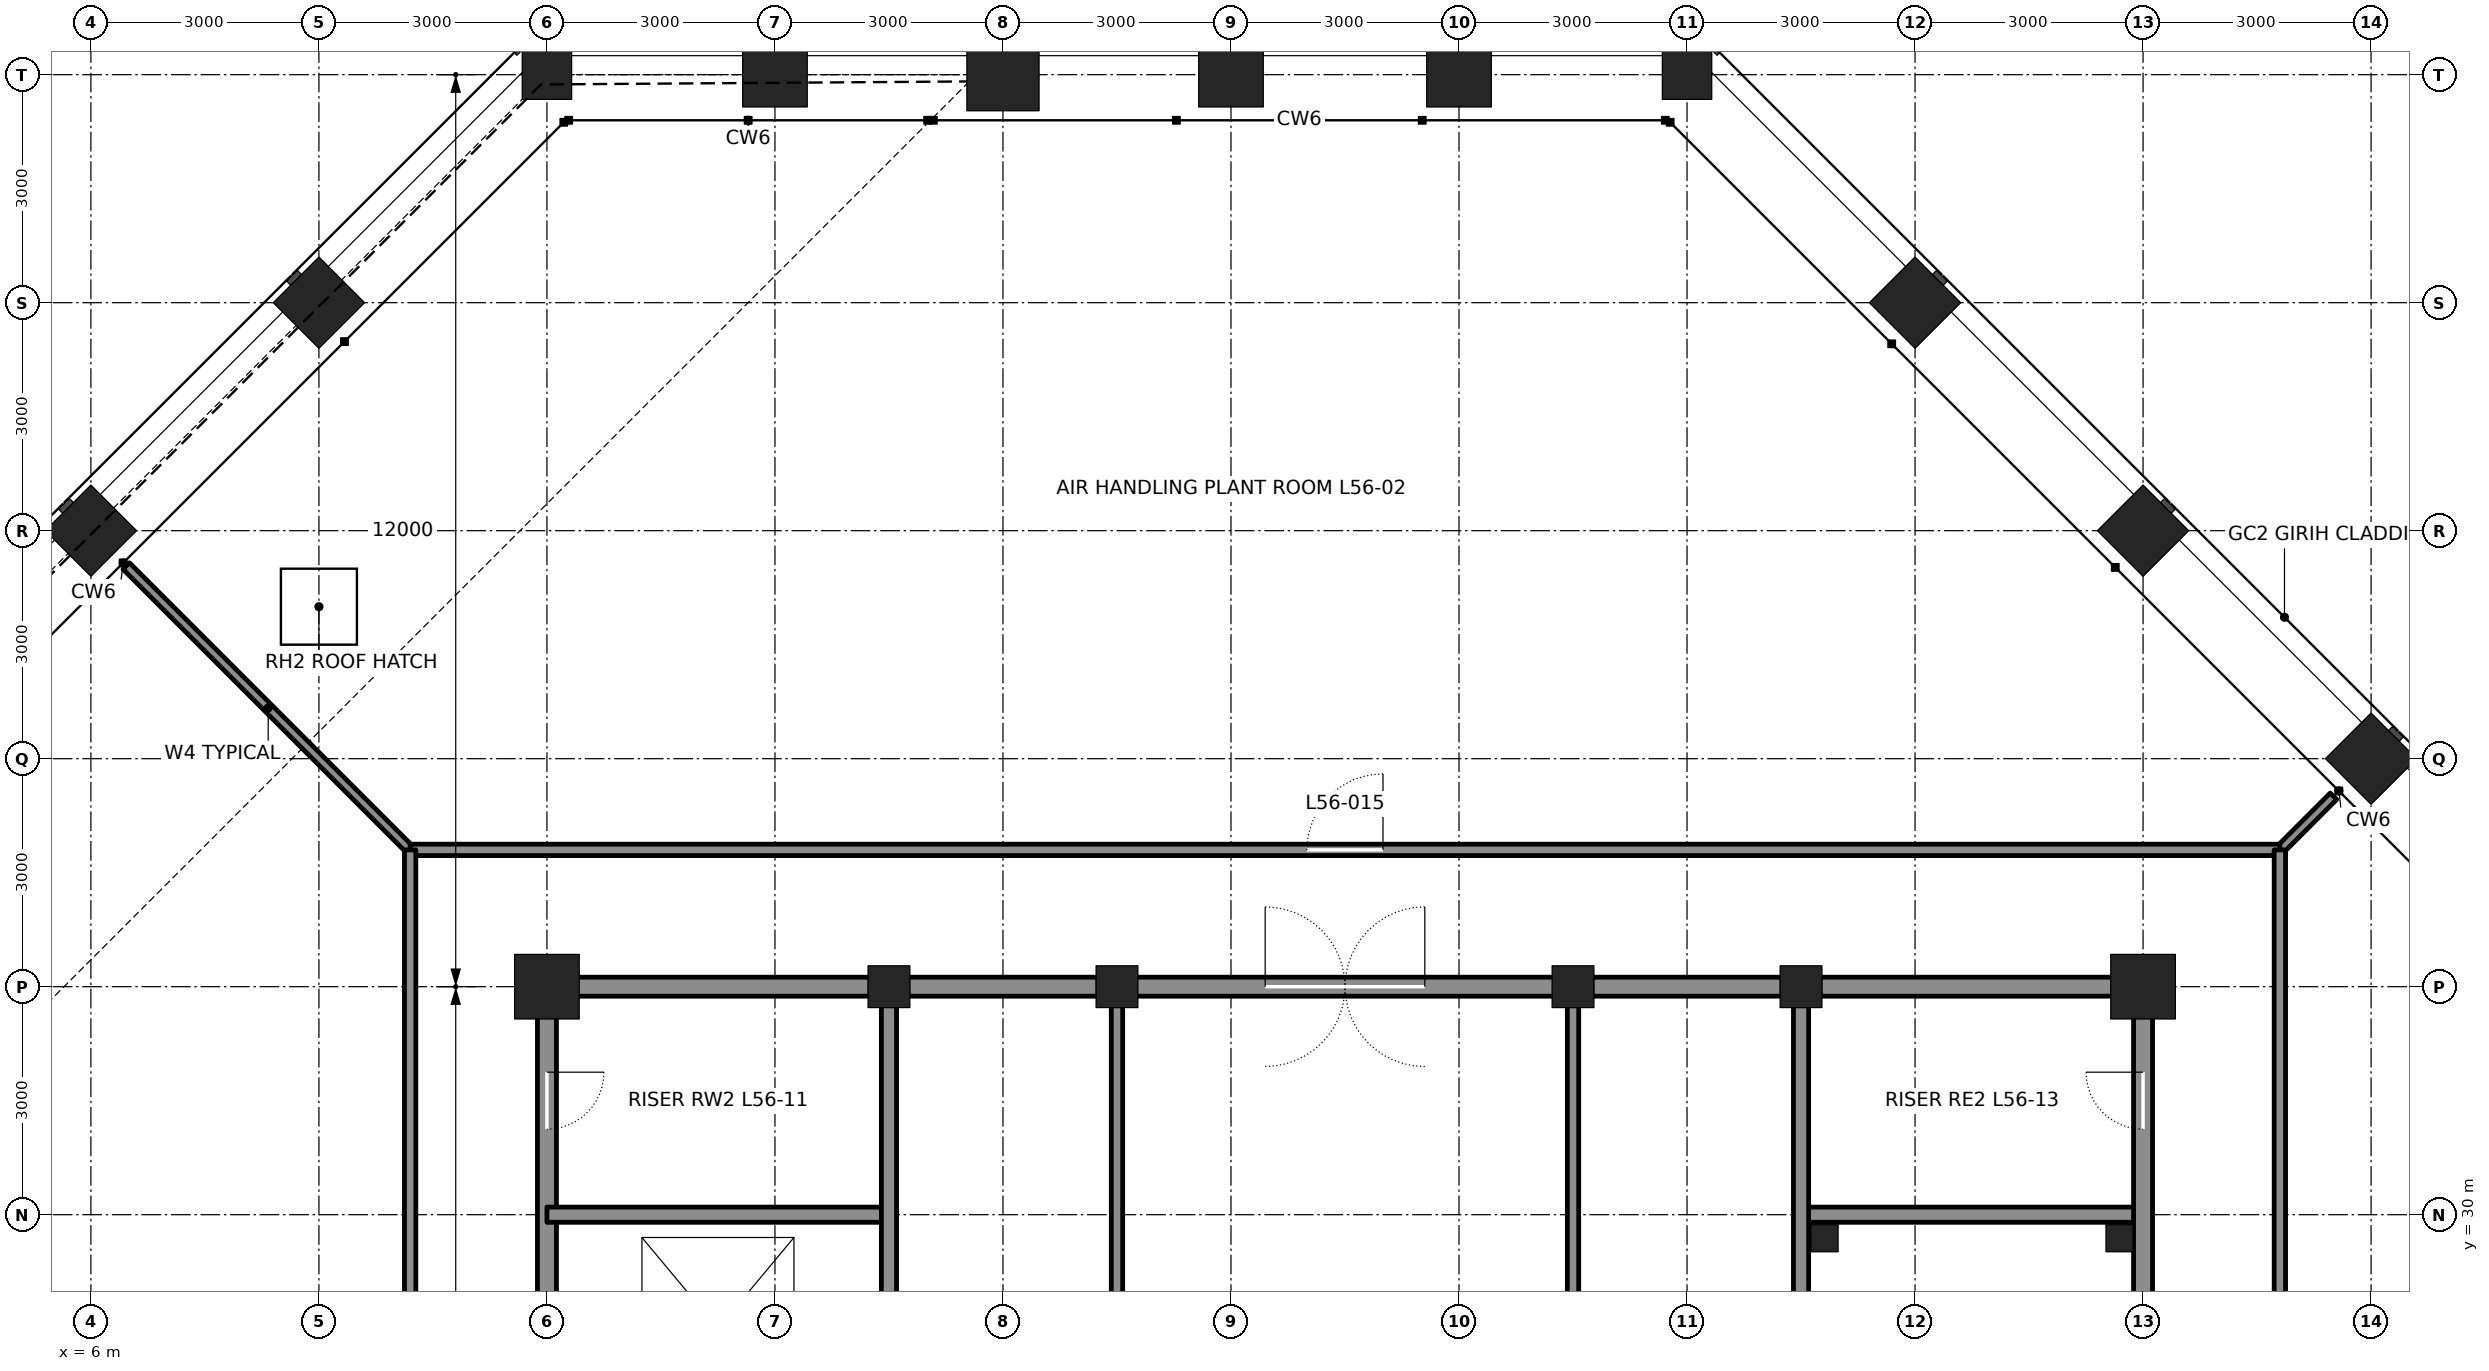
"""IFC4 building model, lengths in metres.
Left out: names, types, materials, properties, quantities, classifications, styles, units other than length and angle.
Written with IfcOpenShell. Run it as: python <this file> out.ifc"""

import sys

from ifc_helpers import new_model, si_unit, direction, frame, frame_2d, origin, origin_2d, place, context, subcontext, project, spatial, rectangle, hollow_rectangle, extrude, element, fill, save


model = new_model("IFC4")
c1 = context("Model", 3, precision=1e-05, world=origin(), true_north=direction((0.0, 1.0)))
c2 = subcontext(c1, "Body", "Model", "MODEL_VIEW")
j1 = project(units=[si_unit("LENGTHUNIT", "METRE"), si_unit("PLANEANGLEUNIT", "RADIAN")], contexts=[c1])
p1 = place(None, origin())
s1 = spatial("IfcSite", under=j1, at=p1, CompositionType="ELEMENT")
p2 = place(p1, origin())
s2 = spatial("IfcBuilding", under=s1, at=p2, CompositionType="ELEMENT")
p3 = place(p2, frame((0.0, 0.0, 251.7)))
s3 = spatial("IfcBuildingStorey", under=s2, at=p3, CompositionType="ELEMENT", Elevation=251.7)
for number, where, z_axis, x_axis in (
    (1, (36.0, 36.0, 0.0), (0.0, 0.0, 1.0), (0.707, 0.707, 0.0)),
    (2, (33.0, 39.0, 0.0), (0.0, 0.0, 1.0), (0.707, 0.707, 0.0)),
    (3, (30.0, 42.0, 0.0), (0.0, 0.0, 1.0), (0.707, 0.707, 0.0)),
):
    element("IfcColumn", number, at=place(p3, frame(where, z_axis=z_axis, x_axis=x_axis)), inside=s3, PredefinedType="COLUMN", context=c2, shape_type="SweptSolid", body=[
        extrude(hollow_rectangle(XDim=0.85, YDim=0.85, WallThickness=0.085, at=origin_2d()), origin(), (0.0, 0.0, 1.0), 6.0),
    ])
p4 = place(p3, frame((27.0, 45.0, 0.0), z_axis=(0.0, 0.0, 1.0), x_axis=(0.0, 1.0, 0.0)))
e4 = element("IfcColumn", 4, at=p4, inside=s3, PredefinedType="COLUMN", context=c2, shape_type="SweptSolid", body=[
    extrude(hollow_rectangle(XDim=0.65, YDim=0.65, WallThickness=0.065, at=origin_2d()), origin(), (0.0, 0.0, 1.0), 6.0),
])
for number, where, z_axis, x_axis in (
    (5, (24.0, 45.0, 0.0), (0.0, 0.0, 1.0), (0.0, 1.0, 0.0)),
    (6, (21.0, 45.0, 0.0), (0.0, 0.0, 1.0), (0.0, 1.0, 0.0)),
):
    element("IfcColumn", number, at=place(p3, frame(where, z_axis=z_axis, x_axis=x_axis)), inside=s3, PredefinedType="COLUMN", context=c2, shape_type="SweptSolid", body=[
        extrude(hollow_rectangle(XDim=0.85, YDim=0.85, WallThickness=0.085, at=origin_2d()), origin(), (0.0, 0.0, 1.0), 6.0),
    ])
p5 = place(p3, frame((18.0, 45.0, 0.0), z_axis=(0.0, 0.0, 1.0), x_axis=(0.0, 1.0, 0.0)))
e7 = element("IfcColumn", 7, at=p5, inside=s3, PredefinedType="COLUMN", context=c2, shape_type="SweptSolid", body=[
    extrude(hollow_rectangle(XDim=0.95, YDim=0.95, WallThickness=0.11, at=origin_2d()), origin(), (0.0, 0.0, 1.0), 6.0),
])
p6 = place(p3, frame((15.0, 45.0, 0.0), z_axis=(0.0, 0.0, 1.0), x_axis=(0.0, 1.0, 0.0)))
e8 = element("IfcColumn", 8, at=p6, inside=s3, PredefinedType="COLUMN", context=c2, shape_type="SweptSolid", body=[
    extrude(hollow_rectangle(XDim=0.85, YDim=0.85, WallThickness=0.085, at=origin_2d()), origin(), (0.0, 0.0, 1.0), 4.149),
])
p7 = place(p3, frame((12.0, 45.0, 0.0), z_axis=(0.0, 0.0, 1.0), x_axis=(0.0, 1.0, 0.0)))
e9 = element("IfcColumn", 9, at=p7, inside=s3, PredefinedType="COLUMN", context=c2, shape_type="SweptSolid", body=[
    extrude(hollow_rectangle(XDim=0.65, YDim=0.65, WallThickness=0.065, at=origin_2d()), origin(), (0.0, 0.0, 1.0), 3.698),
])
for number, where, z_axis, x_axis in (
    (10, (9.0, 42.0, 0.0), (0.0, 0.0, 1.0), (-0.707, 0.707, 0.0)),
    (11, (6.0, 39.0, 0.0), (0.0, 0.0, 1.0), (-0.707, 0.707, 0.0)),
):
    element("IfcColumn", number, at=place(p3, frame(where, z_axis=z_axis, x_axis=x_axis)), inside=s3, PredefinedType="COLUMN", context=c2, shape_type="SweptSolid", body=[
        extrude(hollow_rectangle(XDim=0.85, YDim=0.85, WallThickness=0.085, at=origin_2d()), origin(), (0.0, 0.0, 1.0), 3.698),
    ])
p8 = place(p3, frame((12.0, 33.0, 0.0), z_axis=(0.0, 0.0, 1.0), x_axis=(1.0, 0.0, 0.0)))
e12 = element("IfcColumn", 12, at=p8, inside=s3, PredefinedType="COLUMN", context=c2, shape_type="SweptSolid", body=[
    extrude(hollow_rectangle(XDim=0.85, YDim=0.85, WallThickness=0.085, at=origin_2d()), origin(), (0.0, 0.0, 1.0), 6.0),
])
for number, where, z_axis, x_axis in (
    (13, (16.5, 33.0, 0.0), (0.0, 0.0, 1.0), (1.0, 0.0, 0.0)),
    (14, (19.5, 33.0, 0.0), (0.0, 0.0, 1.0), (1.0, 0.0, 0.0)),
    (15, (25.5, 33.0, 0.0), (0.0, 0.0, 1.0), (1.0, 0.0, 0.0)),
    (16, (28.5, 33.0, 0.0), (0.0, 0.0, 1.0), (1.0, 0.0, 0.0)),
):
    element("IfcColumn", number, at=place(p3, frame(where, z_axis=z_axis, x_axis=x_axis)), inside=s3, PredefinedType="COLUMN", context=c2, shape_type="SweptSolid", body=[
        extrude(hollow_rectangle(XDim=0.55, YDim=0.55, WallThickness=0.045, at=origin_2d()), origin(), (0.0, 0.0, 1.0), 6.0),
    ])
p9 = place(p3, frame((33.0, 33.0, 0.0), z_axis=(0.0, 0.0, 1.0), x_axis=(1.0, 0.0, 0.0)))
e17 = element("IfcColumn", 17, at=p9, inside=s3, PredefinedType="COLUMN", context=c2, shape_type="SweptSolid", body=[
    extrude(hollow_rectangle(XDim=0.85, YDim=0.85, WallThickness=0.085, at=origin_2d()), origin(), (0.0, 0.0, 1.0), 6.0),
])
p10 = place(p3, frame((12.0, 24.25, 0.0), z_axis=(0.0, 0.0, 1.0), x_axis=(0.0, 1.0, 0.0)))
e18 = element("IfcWall", 18, at=p10, inside=s3, PredefinedType="SOLIDWALL", context=c2, shape_type="SweptSolid", body=[
    extrude(rectangle(XDim=8.5, YDim=0.25, at=frame_2d((4.25, 0.0))), origin(), (0.0, 0.0, 1.0), 4.913),
])
p11 = place(p10, frame((0.65, 0.0, 0.0)))
e19 = element("IfcOpeningElement", 19, at=p11, cuts=e18, PredefinedType="OPENING", context=c2, shape_type="SweptSolid", body=[
    extrude(rectangle(XDim=1.2, YDim=2.1, at=frame_2d((0.6, 1.05))), frame((0.0, 0.135, 0.0), z_axis=(0.0, -1.0, 0.0), x_axis=(1.0, 0.0, 0.0)), (0.0, 0.0, 1.0), 0.27),
])
p12 = place(p10, frame((6.875, 0.0, 0.0)))
e20 = element("IfcOpeningElement", 20, at=p12, cuts=e18, PredefinedType="OPENING", context=c2, shape_type="SweptSolid", body=[
    extrude(rectangle(XDim=0.75, YDim=2.1, at=frame_2d((0.375, 1.05))), frame((0.0, 0.135, 0.0), z_axis=(0.0, -1.0, 0.0), x_axis=(1.0, 0.0, 0.0)), (0.0, 0.0, 1.0), 0.27),
])
for number, where, z_axis, x_axis in (
    (21, (12.0, 30.0, 0.0), (0.0, 0.0, 1.0), (1.0, 0.0, 0.0)),
    (22, (28.5, 30.0, 0.0), (0.0, 0.0, 1.0), (1.0, 0.0, 0.0)),
):
    element("IfcWall", number, at=place(p3, frame(where, z_axis=z_axis, x_axis=x_axis)), inside=s3, PredefinedType="SOLIDWALL", context=c2, shape_type="SweptSolid", body=[
        extrude(rectangle(XDim=4.5, YDim=0.2, at=frame_2d((2.25, 0.0))), origin(), (0.0, 0.0, 1.0), 5.84),
    ])
p13 = place(p3, frame((12.25, 33.0, 0.0), z_axis=(0.0, 0.0, 1.0), x_axis=(1.0, 0.0, 0.0)))
e23 = element("IfcWall", 23, at=p13, inside=s3, PredefinedType="SOLIDWALL", context=c2, shape_type="SweptSolid", body=[
    extrude(rectangle(XDim=4.0, YDim=0.25, at=frame_2d((2.0, 0.0))), origin(), (0.0, 0.0, 1.0), 4.981),
])
for number, where, z_axis, x_axis in (
    (24, (16.75, 33.0, 0.0), (0.0, 0.0, 1.0), (1.0, 0.0, 0.0)),
    (25, (25.75, 33.0, 0.0), (0.0, 0.0, 1.0), (1.0, 0.0, 0.0)),
):
    element("IfcWall", number, at=place(p3, frame(where, z_axis=z_axis, x_axis=x_axis)), inside=s3, PredefinedType="SOLIDWALL", context=c2, shape_type="SweptSolid", body=[
        extrude(rectangle(XDim=2.5, YDim=0.25, at=frame_2d((1.25, 0.0))), origin(), (0.0, 0.0, 1.0), 4.981),
    ])
p14 = place(p3, frame((28.75, 33.0, 0.0), z_axis=(0.0, 0.0, 1.0), x_axis=(1.0, 0.0, 0.0)))
e26 = element("IfcWall", 26, at=p14, inside=s3, PredefinedType="SOLIDWALL", context=c2, shape_type="SweptSolid", body=[
    extrude(rectangle(XDim=4.0, YDim=0.25, at=frame_2d((2.0, 0.0))), origin(), (0.0, 0.0, 1.0), 4.981),
])
p15 = place(p3, frame((16.5, 24.25, 0.0), z_axis=(0.0, 0.0, 1.0), x_axis=(0.0, 1.0, 0.0)))
e27 = element("IfcWall", 27, at=p15, inside=s3, PredefinedType="SOLIDWALL", context=c2, shape_type="SweptSolid", body=[
    extrude(rectangle(XDim=8.5, YDim=0.2, at=frame_2d((4.25, 0.0))), origin(), (0.0, 0.0, 1.0), 4.913),
])
for number, where, z_axis, x_axis in (
    (28, (19.5, 27.0, 0.0), (0.0, 0.0, 1.0), (0.0, 1.0, 0.0)),
    (29, (25.5, 27.0, 0.0), (0.0, 0.0, 1.0), (0.0, 1.0, 0.0)),
):
    element("IfcWall", number, at=place(p3, frame(where, z_axis=z_axis, x_axis=x_axis)), inside=s3, PredefinedType="PARTITIONING", context=c2, shape_type="SweptSolid", body=[
        extrude(rectangle(XDim=5.75, YDim=0.15, at=frame_2d((2.875, 0.0))), origin(), (0.0, 0.0, 1.0), 4.865),
    ])
p16 = place(p3, frame((28.5, 24.25, 0.0), z_axis=(0.0, 0.0, 1.0), x_axis=(0.0, 1.0, 0.0)))
e30 = element("IfcWall", 30, at=p16, inside=s3, PredefinedType="SOLIDWALL", context=c2, shape_type="SweptSolid", body=[
    extrude(rectangle(XDim=8.5, YDim=0.2, at=frame_2d((4.25, 0.0))), origin(), (0.0, 0.0, 1.0), 4.913),
])
p17 = place(p3, frame((33.0, 24.25, 0.0), z_axis=(0.0, 0.0, 1.0), x_axis=(0.0, 1.0, 0.0)))
e31 = element("IfcWall", 31, at=p17, inside=s3, PredefinedType="SOLIDWALL", context=c2, shape_type="SweptSolid", body=[
    extrude(rectangle(XDim=8.5, YDim=0.25, at=frame_2d((4.25, 0.0))), origin(), (0.0, 0.0, 1.0), 4.913),
])
p18 = place(p17, frame((6.875, 0.0, 0.0)))
e32 = element("IfcOpeningElement", 32, at=p18, cuts=e31, PredefinedType="OPENING", context=c2, shape_type="SweptSolid", body=[
    extrude(rectangle(XDim=0.75, YDim=2.1, at=frame_2d((0.375, 1.05))), frame((0.0, 0.135, 0.0), z_axis=(0.0, -1.0, 0.0), x_axis=(1.0, 0.0, 0.0)), (0.0, 0.0, 1.0), 0.27),
])
p19 = place(p3, frame((19.5, 33.0, 0.0), z_axis=(0.0, 0.0, 1.0), x_axis=(1.0, 0.0, 0.0)))
e33 = element("IfcWall", 33, at=p19, inside=s3, PredefinedType="SOLIDWALL", context=c2, shape_type="SweptSolid", body=[
    extrude(rectangle(XDim=6.0, YDim=0.25, at=frame_2d((3.0, 0.0))), origin(), (0.0, 0.0, 1.0), 4.981),
])
p20 = place(p19, frame((1.95, 0.0, 0.0)))
e34 = element("IfcOpeningElement", 34, at=p20, cuts=e33, PredefinedType="OPENING", context=c2, shape_type="SweptSolid", body=[
    extrude(rectangle(XDim=2.1, YDim=2.4, at=frame_2d((1.05, 1.2))), frame((0.0, 0.135, 0.0), z_axis=(0.0, -1.0, 0.0), x_axis=(1.0, 0.0, 0.0)), (0.0, 0.0, 1.0), 0.27),
])
p21 = place(p3, frame((34.8, 34.8, 0.0), z_axis=(0.0, 0.0, 1.0), x_axis=(0.707106781187, 0.707106781187, 0.0)))
e35 = element("IfcWall", 35, at=p21, inside=s3, PredefinedType="PARTITIONING", context=c2, shape_type="SweptSolid", body=[
    extrude(rectangle(XDim=0.997, YDim=0.12, at=frame_2d((0.499, 0.0))), origin(), (0.0, 0.0, 1.0), 5.84),
])
p22 = place(p3, frame((10.2, 34.8, 0.0), z_axis=(0.0, 0.0, 1.0), x_axis=(-0.707106781187, 0.707106781187, 0.0)))
e36 = element("IfcWall", 36, at=p22, inside=s3, PredefinedType="PARTITIONING", context=c2, shape_type="SweptSolid", body=[
    extrude(rectangle(XDim=5.282, YDim=0.12, at=frame_2d((2.641, 0.0))), origin(), (0.0, 0.0, 1.0), 5.84),
])
p23 = place(p3, frame((10.2, 34.8, 0.0), z_axis=(0.0, 0.0, 1.0), x_axis=(1.0, 0.0, 0.0)))
e37 = element("IfcWall", 37, at=p23, inside=s3, PredefinedType="PARTITIONING", context=c2, shape_type="SweptSolid", body=[
    extrude(rectangle(XDim=24.6, YDim=0.15, at=frame_2d((12.3, 0.0))), origin(), (0.0, 0.0, 1.0), 5.84),
])
p24 = place(p23, frame((11.8, 0.0, 0.0)))
e38 = element("IfcOpeningElement", 38, at=p24, cuts=e37, PredefinedType="OPENING", context=c2, shape_type="SweptSolid", body=[
    extrude(rectangle(XDim=1.0, YDim=2.4, at=frame_2d((0.5, 1.2))), frame((0.0, 0.085, 0.0), z_axis=(0.0, -1.0, 0.0), x_axis=(1.0, 0.0, 0.0)), (0.0, 0.0, 1.0), 0.17),
])
p25 = place(p3, frame((10.2, 10.2, 0.0), z_axis=(0.0, 0.0, 1.0), x_axis=(0.0, 1.0, 0.0)))
e39 = element("IfcWall", 39, at=p25, inside=s3, PredefinedType="PARTITIONING", context=c2, shape_type="SweptSolid", body=[
    extrude(rectangle(XDim=24.6, YDim=0.15, at=frame_2d((12.3, 0.0))), origin(), (0.0, 0.0, 1.0), 5.84),
])
p26 = place(p25, frame((11.8, 0.0, 0.0)))
e40 = element("IfcOpeningElement", 40, at=p26, cuts=e39, PredefinedType="OPENING", context=c2, shape_type="SweptSolid", body=[
    extrude(rectangle(XDim=1.0, YDim=2.4, at=frame_2d((0.5, 1.2))), frame((0.0, 0.085, 0.0), z_axis=(0.0, -1.0, 0.0), x_axis=(1.0, 0.0, 0.0)), (0.0, 0.0, 1.0), 0.17),
])
p27 = place(p3, frame((34.8, 10.2, 0.0), z_axis=(0.0, 0.0, 1.0), x_axis=(0.0, 1.0, 0.0)))
e41 = element("IfcWall", 41, at=p27, inside=s3, PredefinedType="PARTITIONING", context=c2, shape_type="SweptSolid", body=[
    extrude(rectangle(XDim=24.6, YDim=0.15, at=frame_2d((12.3, 0.0))), origin(), (0.0, 0.0, 1.0), 5.84),
])
p28 = place(p27, frame((11.8, 0.0, 0.0)))
e42 = element("IfcOpeningElement", 42, at=p28, cuts=e41, PredefinedType="OPENING", context=c2, shape_type="SweptSolid", body=[
    extrude(rectangle(XDim=1.0, YDim=2.4, at=frame_2d((0.5, 1.2))), frame((0.0, 0.085, 0.0), z_axis=(0.0, -1.0, 0.0), x_axis=(1.0, 0.0, 0.0)), (0.0, 0.0, 1.0), 0.17),
])
for number, where, z_axis, x_axis in (
    (43, (28.81, 29.69, 0.0), (0.0, 0.0, 1.0), (1.0, 0.0, 0.0)),
    (44, (32.69, 29.69, 0.0), (0.0, 0.0, 1.0), (1.0, 0.0, 0.0)),
):
    element("IfcColumn", number, at=place(p3, frame(where, z_axis=z_axis, x_axis=x_axis)), inside=s3, PredefinedType="COLUMN", context=c2, shape_type="SweptSolid", body=[
        extrude(hollow_rectangle(XDim=0.356, YDim=0.356, WallThickness=0.009, at=origin_2d()), origin(), (0.0, 0.0, 1.0), 6.0),
    ])
p29 = place(p3, frame((9.0, 38.0, 5.195)))
p30 = place(p29, frame((0.0, 0.0, 0.454)))
e45 = element("IfcDoor", 45, at=p30, inside=s3, OperationType="SINGLE_SWING_LEFT", PredefinedType="TRAPDOOR", context=c2, shape_type="SweptSolid", body=[
    extrude(rectangle(XDim=1.0, YDim=1.0, at=origin_2d()), origin(), (0.0, 0.0, 1.0), 0.05),
])
p31 = place(p20, origin())
e46 = element("IfcDoor", 46, at=p31, inside=s3, OperationType="DOUBLE_DOOR_DOUBLE_SWING", PredefinedType="DOOR", context=c2, shape_type="SweptSolid", body=[
    extrude(rectangle(XDim=2.1, YDim=2.4, at=frame_2d((1.05, 1.2))), frame((0.0, 0.025, 0.0), z_axis=(0.0, -1.0, 0.0), x_axis=(1.0, 0.0, 0.0)), (0.0, 0.0, 1.0), 0.05),
])
fill(e34, e46)
p32 = place(p12, frame((0.75, 0.0, 0.0), z_axis=(0.0, 0.0, 1.0), x_axis=(-1.0, 0.0, 0.0)))
e47 = element("IfcDoor", 47, at=p32, inside=s3, OperationType="SINGLE_SWING_LEFT", PredefinedType="DOOR", context=c2, shape_type="SweptSolid", body=[
    extrude(rectangle(XDim=0.75, YDim=2.1, at=frame_2d((0.375, 1.05))), frame((0.0, 0.025, 0.0), z_axis=(0.0, -1.0, 0.0), x_axis=(1.0, 0.0, 0.0)), (0.0, 0.0, 1.0), 0.05),
])
fill(e20, e47)
p33 = place(p18, origin())
e48 = element("IfcDoor", 48, at=p33, inside=s3, OperationType="SINGLE_SWING_RIGHT", PredefinedType="DOOR", context=c2, shape_type="SweptSolid", body=[
    extrude(rectangle(XDim=0.75, YDim=2.1, at=frame_2d((0.375, 1.05))), frame((0.0, 0.025, 0.0), z_axis=(0.0, -1.0, 0.0), x_axis=(1.0, 0.0, 0.0)), (0.0, 0.0, 1.0), 0.05),
])
fill(e32, e48)
p34 = place(p24, origin())
e49 = element("IfcDoor", 49, at=p34, inside=s3, OperationType="SINGLE_SWING_RIGHT", PredefinedType="DOOR", context=c2, shape_type="SweptSolid", body=[
    extrude(rectangle(XDim=1.0, YDim=2.4, at=frame_2d((0.5, 1.2))), frame((0.0, 0.025, 0.0), z_axis=(0.0, -1.0, 0.0), x_axis=(1.0, 0.0, 0.0)), (0.0, 0.0, 1.0), 0.05),
])
fill(e38, e49)
save(model, sys.argv[1])
